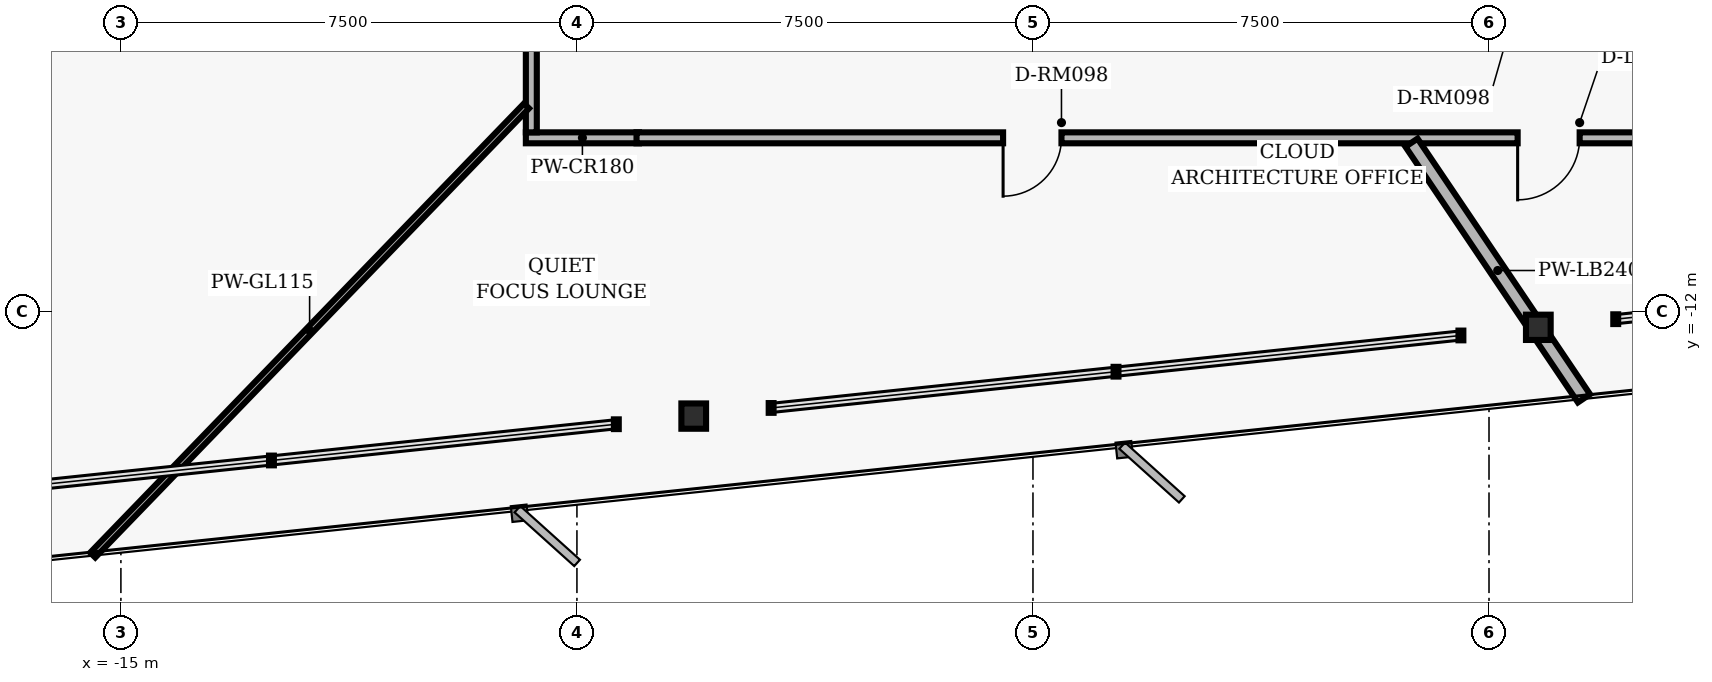
"""IFC4 building model, lengths in metres.
Left out: names, types, materials, properties, quantities, classifications, styles, units other than length and angle.
Written with IfcOpenShell. Run it as: python <this file> out.ifc"""

import sys

from ifc_helpers import new_model, si_unit, direction, frame, frame_2d, origin, origin_2d, place, context, subcontext, project, spatial, rectangle, i_section, extrude, element, fill, save


model = new_model("IFC4")
c1 = context("Model", 3, precision=1e-05, world=origin(), true_north=direction((0.0, 1.0)))
c2 = subcontext(c1, "Body", "Model", "MODEL_VIEW")
j1 = project(units=[si_unit("LENGTHUNIT", "METRE"), si_unit("PLANEANGLEUNIT", "RADIAN")], contexts=[c1])
p1 = place(None, origin())
s1 = spatial("IfcSite", under=j1, at=p1, CompositionType="ELEMENT")
p2 = place(p1, origin())
s2 = spatial("IfcBuilding", under=s1, at=p2, CompositionType="ELEMENT")
p3 = place(p2, frame((0.0, 0.0, 119.84)))
s3 = spatial("IfcBuildingStorey", under=s2, at=p3, CompositionType="ELEMENT", Elevation=119.84)
for number, where, z_axis, x_axis in (
    (1, (-5.579, -13.727, 0.0), (0.0, 0.0, 1.0), (1.0, 0.0, 0.0)),
    (2, (8.311, -12.267, 0.0), (0.0, 0.0, 1.0), (1.0, 0.0, 0.0)),
):
    element("IfcColumn", number, at=place(p3, frame(where, z_axis=z_axis, x_axis=x_axis)), inside=s3, PredefinedType="COLUMN", context=c2, shape_type="SweptSolid", body=[
        extrude(i_section(OverallWidth=0.406, OverallDepth=0.416, WebThickness=0.03, FlangeThickness=0.048, FilletRadius=0.02, at=origin_2d()), origin(), (0.0, 0.0, 1.0), 3.04),
    ])
p4 = place(p3, frame((-6.48, -9.15, 0.0), z_axis=(0.0, 0.0, 1.0), x_axis=(-1.0, 0.0, 0.0)))
e3 = element("IfcWall", 3, at=p4, inside=s3, PredefinedType="PARTITIONING", context=c2, shape_type="SweptSolid", body=[
    extrude(rectangle(XDim=1.86, YDim=0.18, at=frame_2d((0.93, 0.0))), origin(), (0.0, 0.0, 1.0), 2.33),
])
p5 = place(p3, frame((-8.25, -9.06, 0.0), z_axis=(0.0, 0.0, 1.0), x_axis=(0.0, 1.0, 0.0)))
e4 = element("IfcWall", 4, at=p5, inside=s3, PredefinedType="PARTITIONING", context=c2, shape_type="SweptSolid", body=[
    extrude(rectangle(XDim=1.88, YDim=0.18, at=frame_2d((0.94, 0.0))), origin(), (0.0, 0.0, 1.0), 2.763),
])
p6 = place(p3, frame((10.98, -9.15, 0.0), z_axis=(0.0, 0.0, 1.0), x_axis=(-1.0, 0.0, 0.0)))
e5 = element("IfcWall", 5, at=p6, inside=s3, PredefinedType="PARTITIONING", context=c2, shape_type="SweptSolid", body=[
    extrude(rectangle(XDim=17.5, YDim=0.18, at=frame_2d((8.75, 0.0))), origin(), (0.0, 0.0, 1.0), 2.33),
])
p7 = place(p6, frame((10.511, 0.0, 0.0)))
e6 = element("IfcOpeningElement", 6, at=p7, cuts=e5, PredefinedType="OPENING", context=c2, shape_type="SweptSolid", body=[
    extrude(rectangle(XDim=0.96, YDim=2.02, at=frame_2d((0.48, 1.01))), frame((0.0, 0.1, 0.0), z_axis=(0.0, -1.0, 0.0), x_axis=(1.0, 0.0, 0.0)), (0.0, 0.0, 1.0), 0.2),
])
p8 = place(p6, frame((1.989, 0.0, 0.0)))
e7 = element("IfcOpeningElement", 7, at=p8, cuts=e5, PredefinedType="OPENING", context=c2, shape_type="SweptSolid", body=[
    extrude(rectangle(XDim=1.02, YDim=2.02, at=frame_2d((0.51, 1.01))), frame((0.0, 0.1, 0.0), z_axis=(0.0, -1.0, 0.0), x_axis=(1.0, 0.0, 0.0)), (0.0, 0.0, 1.0), 0.2),
])
p9 = place(p3, frame((-8.33, -8.626, 0.0), z_axis=(0.0, 0.0, 1.0), x_axis=(-0.694659007852, -0.719339184815, 0.0)))
e8 = element("IfcWall", 8, at=p9, inside=s3, PredefinedType="MOVABLE", context=c2, shape_type="SweptSolid", body=[
    extrude(rectangle(XDim=10.268, YDim=0.115, at=frame_2d((5.134, 0.0))), origin(), (0.0, 0.0, 1.0), 2.763),
])
p10 = place(p3, frame((6.226, -9.23, 0.0), z_axis=(0.0, 0.0, 1.0), x_axis=(0.559190912305, -0.82903891561, 0.0)))
e9 = element("IfcWall", 9, at=p10, inside=s3, PredefinedType="PARTITIONING", context=c2, shape_type="SweptSolid", body=[
    extrude(rectangle(XDim=5.072, YDim=0.24, at=frame_2d((2.536, 0.0))), origin(), (0.0, 0.0, 1.0), 2.763),
])
p11 = place(p7, origin())
e10 = element("IfcDoor", 10, at=p11, inside=s3, OperationType="SINGLE_SWING_RIGHT", PredefinedType="DOOR", context=c2, shape_type="SweptSolid", body=[
    extrude(rectangle(XDim=0.96, YDim=2.02, at=frame_2d((0.48, 1.01))), frame((0.0, 0.025, 0.0), z_axis=(0.0, -1.0, 0.0), x_axis=(1.0, 0.0, 0.0)), (0.0, 0.0, 1.0), 0.05),
])
fill(e6, e10)
p12 = place(p8, origin())
e11 = element("IfcDoor", 11, at=p12, inside=s3, OperationType="SINGLE_SWING_RIGHT", PredefinedType="DOOR", context=c2, shape_type="SweptSolid", body=[
    extrude(rectangle(XDim=1.02, YDim=2.02, at=frame_2d((0.51, 1.01))), frame((0.0, 0.025, 0.0), z_axis=(0.0, -1.0, 0.0), x_axis=(1.0, 0.0, 0.0)), (0.0, 0.0, 1.0), 0.05),
])
fill(e7, e11)
save(model, sys.argv[1])
